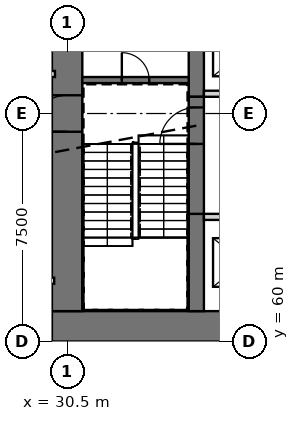
"""IFC4 building model, lengths in metres.
Left out: names, types, materials, properties, quantities, classifications, styles, units other than length and angle.
Written with IfcOpenShell. Run it as: python <this file> out.ifc"""

import sys

from ifc_helpers import new_model, si_unit, direction, frame, frame_2d, origin, place, context, subcontext, project, spatial, rectangle, extrude, element, fill, save


model = new_model("IFC4")
c1 = context("Model", 3, precision=1e-05, world=origin(), true_north=direction((0.0, 1.0)))
c2 = subcontext(c1, "Body", "Model", "MODEL_VIEW")
j1 = project(units=[si_unit("LENGTHUNIT", "METRE"), si_unit("PLANEANGLEUNIT", "RADIAN")], contexts=[c1])
p1 = place(None, origin())
s1 = spatial("IfcSite", under=j1, at=p1, CompositionType="ELEMENT")
p2 = place(p1, origin())
s2 = spatial("IfcBuilding", under=s1, at=p2, CompositionType="ELEMENT")
p3 = place(p2, origin())
s3 = spatial("IfcBuildingStorey", under=s2, at=p3, CompositionType="ELEMENT", Elevation=0.0)
p4 = place(p3, frame((30.0, 60.5, 0.0), z_axis=(0.0, 0.0, 1.0), x_axis=(1.0, 0.0, 0.0)))
e1 = element("IfcWall", 1, at=p4, inside=s3, PredefinedType="SHEAR", context=c2, shape_type="SweptSolid", body=[
    extrude(rectangle(XDim=30.0, YDim=1.0, at=frame_2d((15.0, 0.0))), origin(), (0.0, 0.0, 1.0), 8.0),
])
p5 = place(p4, frame((21.9, 0.0, 0.0)))
e2 = element("IfcOpeningElement", 2, at=p5, cuts=e1, PredefinedType="OPENING", context=c2, shape_type="SweptSolid", body=[
    extrude(rectangle(XDim=1.8, YDim=2.1, at=frame_2d((0.9, 1.05))), frame((0.0, 0.51, 0.0), z_axis=(0.0, -1.0, 0.0), x_axis=(1.0, 0.0, 0.0)), (0.0, 0.0, 1.0), 1.02),
])
p6 = place(p4, frame((26.5, 0.0, 0.0)))
e3 = element("IfcOpeningElement", 3, at=p6, cuts=e1, PredefinedType="OPENING", context=c2, shape_type="SweptSolid", body=[
    extrude(rectangle(XDim=1.2, YDim=2.1, at=frame_2d((0.6, 1.05))), frame((0.0, 0.51, 0.0), z_axis=(0.0, -1.0, 0.0), x_axis=(1.0, 0.0, 0.0)), (0.0, 0.0, 1.0), 1.02),
])
p7 = place(p3, frame((30.5, 61.0, 0.0), z_axis=(0.0, 0.0, 1.0), x_axis=(0.0, 1.0, 0.0)))
e4 = element("IfcWall", 4, at=p7, inside=s3, PredefinedType="SHEAR", context=c2, shape_type="SweptSolid", body=[
    extrude(rectangle(XDim=20.5, YDim=1.0, at=frame_2d((10.25, 0.0))), origin(), (0.0, 0.0, 1.0), 8.0),
])
p8 = place(p7, frame((5.9, 0.0, 0.0)))
e5 = element("IfcOpeningElement", 5, at=p8, cuts=e4, PredefinedType="OPENING", context=c2, shape_type="SweptSolid", body=[
    extrude(rectangle(XDim=1.2, YDim=2.1, at=frame_2d((0.6, 1.05))), frame((0.0, 0.51, 0.0), z_axis=(0.0, -1.0, 0.0), x_axis=(1.0, 0.0, 0.0)), (0.0, 0.0, 1.0), 1.02),
])
p9 = place(p7, frame((13.6, 0.0, 0.0)))
e6 = element("IfcOpeningElement", 6, at=p9, cuts=e4, PredefinedType="OPENING", context=c2, shape_type="SweptSolid", body=[
    extrude(rectangle(XDim=1.2, YDim=2.1, at=frame_2d((0.6, 1.05))), frame((0.0, 0.51, 0.0), z_axis=(0.0, -1.0, 0.0), x_axis=(1.0, 0.0, 0.0)), (0.0, 0.0, 1.0), 1.02),
])
p10 = place(p3, frame((34.75, 61.0, 0.0), z_axis=(0.0, 0.0, 1.0), x_axis=(0.0, 1.0, 0.0)))
e7 = element("IfcWall", 7, at=p10, inside=s3, PredefinedType="SHEAR", context=c2, shape_type="SweptSolid", body=[
    extrude(rectangle(XDim=3.2, YDim=0.5, at=frame_2d((1.6, 0.0))), origin(), (0.0, 0.0, 1.0), 8.0),
])
p11 = place(p3, frame((34.75, 68.05, 0.0), z_axis=(0.0, 0.0, 1.0), x_axis=(0.0, 1.0, 0.0)))
e8 = element("IfcWall", 8, at=p11, inside=s3, PredefinedType="SHEAR", context=c2, shape_type="SweptSolid", body=[
    extrude(rectangle(XDim=6.4, YDim=0.5, at=frame_2d((3.2, 0.0))), origin(), (0.0, 0.0, 1.0), 8.0),
])
p12 = place(p3, frame((35.0, 64.1, 0.0), z_axis=(0.0, 0.0, 1.0), x_axis=(1.0, 0.0, 0.0)))
e9 = element("IfcWall", 9, at=p12, inside=s3, PredefinedType="SOLIDWALL", context=c2, shape_type="SweptSolid", body=[
    extrude(rectangle(XDim=13.0, YDim=0.2, at=frame_2d((6.5, 0.0))), origin(), (0.0, 0.0, 1.0), 8.0),
])
p13 = place(p12, frame((0.75, 0.0, 0.0)))
e10 = element("IfcOpeningElement", 10, at=p13, cuts=e9, PredefinedType="OPENING", context=c2, shape_type="SweptSolid", body=[
    extrude(rectangle(XDim=1.1, YDim=2.1, at=frame_2d((0.55, 1.05))), frame((0.0, 0.11, 0.0), z_axis=(0.0, -1.0, 0.0), x_axis=(1.0, 0.0, 0.0)), (0.0, 0.0, 1.0), 0.22),
])
p14 = place(p12, frame((3.35, 0.0, 0.0)))
e11 = element("IfcOpeningElement", 11, at=p14, cuts=e9, PredefinedType="OPENING", context=c2, shape_type="SweptSolid", body=[
    extrude(rectangle(XDim=1.1, YDim=2.1, at=frame_2d((0.55, 1.05))), frame((0.0, 0.11, 0.0), z_axis=(0.0, -1.0, 0.0), x_axis=(1.0, 0.0, 0.0)), (0.0, 0.0, 1.0), 0.22),
])
p15 = place(p12, frame((5.95, 0.0, 0.0)))
e12 = element("IfcOpeningElement", 12, at=p15, cuts=e9, PredefinedType="OPENING", context=c2, shape_type="SweptSolid", body=[
    extrude(rectangle(XDim=1.1, YDim=2.1, at=frame_2d((0.55, 1.05))), frame((0.0, 0.11, 0.0), z_axis=(0.0, -1.0, 0.0), x_axis=(1.0, 0.0, 0.0)), (0.0, 0.0, 1.0), 0.22),
])
p16 = place(p12, frame((8.55, 0.0, 0.0)))
e13 = element("IfcOpeningElement", 13, at=p16, cuts=e9, PredefinedType="OPENING", context=c2, shape_type="SweptSolid", body=[
    extrude(rectangle(XDim=1.1, YDim=2.1, at=frame_2d((0.55, 1.05))), frame((0.0, 0.11, 0.0), z_axis=(0.0, -1.0, 0.0), x_axis=(1.0, 0.0, 0.0)), (0.0, 0.0, 1.0), 0.22),
])
p17 = place(p12, frame((11.15, 0.0, 0.0)))
e14 = element("IfcOpeningElement", 14, at=p17, cuts=e9, PredefinedType="OPENING", context=c2, shape_type="SweptSolid", body=[
    extrude(rectangle(XDim=1.1, YDim=2.1, at=frame_2d((0.55, 1.05))), frame((0.0, 0.11, 0.0), z_axis=(0.0, -1.0, 0.0), x_axis=(1.0, 0.0, 0.0)), (0.0, 0.0, 1.0), 0.22),
])
p18 = place(p3, frame((35.0, 68.15, 0.0), z_axis=(0.0, 0.0, 1.0), x_axis=(1.0, 0.0, 0.0)))
e15 = element("IfcWall", 15, at=p18, inside=s3, PredefinedType="SOLIDWALL", context=c2, shape_type="SweptSolid", body=[
    extrude(rectangle(XDim=13.0, YDim=0.2, at=frame_2d((6.5, 0.0))), origin(), (0.0, 0.0, 1.0), 8.0),
])
p19 = place(p18, frame((0.75, 0.0, 0.0)))
e16 = element("IfcOpeningElement", 16, at=p19, cuts=e15, PredefinedType="OPENING", context=c2, shape_type="SweptSolid", body=[
    extrude(rectangle(XDim=1.1, YDim=2.1, at=frame_2d((0.55, 1.05))), frame((0.0, 0.11, 0.0), z_axis=(0.0, -1.0, 0.0), x_axis=(1.0, 0.0, 0.0)), (0.0, 0.0, 1.0), 0.22),
])
p20 = place(p18, frame((3.35, 0.0, 0.0)))
e17 = element("IfcOpeningElement", 17, at=p20, cuts=e15, PredefinedType="OPENING", context=c2, shape_type="SweptSolid", body=[
    extrude(rectangle(XDim=1.1, YDim=2.1, at=frame_2d((0.55, 1.05))), frame((0.0, 0.11, 0.0), z_axis=(0.0, -1.0, 0.0), x_axis=(1.0, 0.0, 0.0)), (0.0, 0.0, 1.0), 0.22),
])
p21 = place(p18, frame((5.95, 0.0, 0.0)))
e18 = element("IfcOpeningElement", 18, at=p21, cuts=e15, PredefinedType="OPENING", context=c2, shape_type="SweptSolid", body=[
    extrude(rectangle(XDim=1.1, YDim=2.1, at=frame_2d((0.55, 1.05))), frame((0.0, 0.11, 0.0), z_axis=(0.0, -1.0, 0.0), x_axis=(1.0, 0.0, 0.0)), (0.0, 0.0, 1.0), 0.22),
])
p22 = place(p18, frame((8.55, 0.0, 0.0)))
e19 = element("IfcOpeningElement", 19, at=p22, cuts=e15, PredefinedType="OPENING", context=c2, shape_type="SweptSolid", body=[
    extrude(rectangle(XDim=1.1, YDim=2.1, at=frame_2d((0.55, 1.05))), frame((0.0, 0.11, 0.0), z_axis=(0.0, -1.0, 0.0), x_axis=(1.0, 0.0, 0.0)), (0.0, 0.0, 1.0), 0.22),
])
p23 = place(p18, frame((11.15, 0.0, 0.0)))
e20 = element("IfcOpeningElement", 20, at=p23, cuts=e15, PredefinedType="OPENING", context=c2, shape_type="SweptSolid", body=[
    extrude(rectangle(XDim=1.1, YDim=2.1, at=frame_2d((0.55, 1.05))), frame((0.0, 0.11, 0.0), z_axis=(0.0, -1.0, 0.0), x_axis=(1.0, 0.0, 0.0)), (0.0, 0.0, 1.0), 0.22),
])
p24 = place(p3, frame((34.75, 64.2, 0.0), z_axis=(0.0, 0.0, 1.0), x_axis=(0.0, 1.0, 0.0)))
e21 = element("IfcWall", 21, at=p24, inside=s3, PredefinedType="SOLIDWALL", context=c2, shape_type="SweptSolid", body=[
    extrude(rectangle(XDim=3.85, YDim=0.5, at=frame_2d((1.925, 0.0))), origin(), (0.0, 0.0, 1.0), 6.8),
])
p25 = place(p24, frame((2.3, 0.0, 0.0)))
e22 = element("IfcOpeningElement", 22, at=p25, cuts=e21, PredefinedType="OPENING", context=c2, shape_type="SweptSolid", body=[
    extrude(rectangle(XDim=1.2, YDim=2.1, at=frame_2d((0.6, 1.05))), frame((0.0, 0.26, 0.0), z_axis=(0.0, -1.0, 0.0), x_axis=(1.0, 0.0, 0.0)), (0.0, 0.0, 1.0), 0.52),
])
p26 = place(p3, frame((31.0, 68.6, 0.0), z_axis=(0.0, 0.0, 1.0), x_axis=(1.0, 0.0, 0.0)))
e23 = element("IfcWall", 23, at=p26, inside=s3, PredefinedType="SOLIDWALL", context=c2, shape_type="SweptSolid", body=[
    extrude(rectangle(XDim=3.5, YDim=0.2, at=frame_2d((1.75, 0.0))), origin(), (0.0, 0.0, 1.0), 7.7),
])
p27 = place(p26, frame((1.3, 0.0, 0.0)))
e24 = element("IfcOpeningElement", 24, at=p27, cuts=e23, PredefinedType="OPENING", context=c2, shape_type="SweptSolid", body=[
    extrude(rectangle(XDim=0.9, YDim=2.1, at=frame_2d((0.45, 1.05))), frame((0.0, 0.11, 0.0), z_axis=(0.0, -1.0, 0.0), x_axis=(1.0, 0.0, 0.0)), (0.0, 0.0, 1.0), 0.22),
])
p28 = place(p3, frame((15.8, 62.0, 0.0), z_axis=(0.0, 0.0, 1.0), x_axis=(1.0, 0.0, 0.0)))
e25 = element("IfcWall", 25, at=p28, inside=s3, PredefinedType="PARTITIONING", context=c2, shape_type="SweptSolid", body=[
    extrude(rectangle(XDim=14.275, YDim=0.2, at=frame_2d((7.137, 0.0))), origin(), (0.0, 0.0, 1.0), 7.7),
])
p29 = place(p3, frame((25.9, 68.8, 0.0), z_axis=(0.0, 0.0, 1.0), x_axis=(1.0, 0.0, 0.0)))
e26 = element("IfcWall", 26, at=p29, inside=s3, PredefinedType="PARTITIONING", context=c2, shape_type="SweptSolid", body=[
    extrude(rectangle(XDim=4.2, YDim=0.2, at=frame_2d((2.1, 0.0))), origin(), (0.0, 0.0, 1.0), 7.7),
])
p30 = place(p25, origin())
e27 = element("IfcDoor", 27, at=p30, inside=s3, OperationType="SINGLE_SWING_LEFT", PredefinedType="DOOR", context=c2, shape_type="SweptSolid", body=[
    extrude(rectangle(XDim=1.2, YDim=2.1, at=frame_2d((0.6, 1.05))), frame((0.0, 0.025, 0.0), z_axis=(0.0, -1.0, 0.0), x_axis=(1.0, 0.0, 0.0)), (0.0, 0.0, 1.0), 0.05),
])
fill(e22, e27)
p31 = place(p8, origin())
e28 = element("IfcDoor", 28, at=p31, inside=s3, OperationType="SINGLE_SWING_LEFT", PredefinedType="DOOR", context=c2, shape_type="SweptSolid", body=[
    extrude(rectangle(XDim=1.2, YDim=2.1, at=frame_2d((0.6, 1.05))), frame((0.0, 0.025, 0.0), z_axis=(0.0, -1.0, 0.0), x_axis=(1.0, 0.0, 0.0)), (0.0, 0.0, 1.0), 0.05),
])
fill(e5, e28)
p32 = place(p27, origin())
e29 = element("IfcDoor", 29, at=p32, inside=s3, OperationType="SINGLE_SWING_LEFT", PredefinedType="DOOR", context=c2, shape_type="SweptSolid", body=[
    extrude(rectangle(XDim=0.9, YDim=2.1, at=frame_2d((0.45, 1.05))), frame((0.0, 0.025, 0.0), z_axis=(0.0, -1.0, 0.0), x_axis=(1.0, 0.0, 0.0)), (0.0, 0.0, 1.0), 0.05),
])
fill(e24, e29)
save(model, sys.argv[1])
